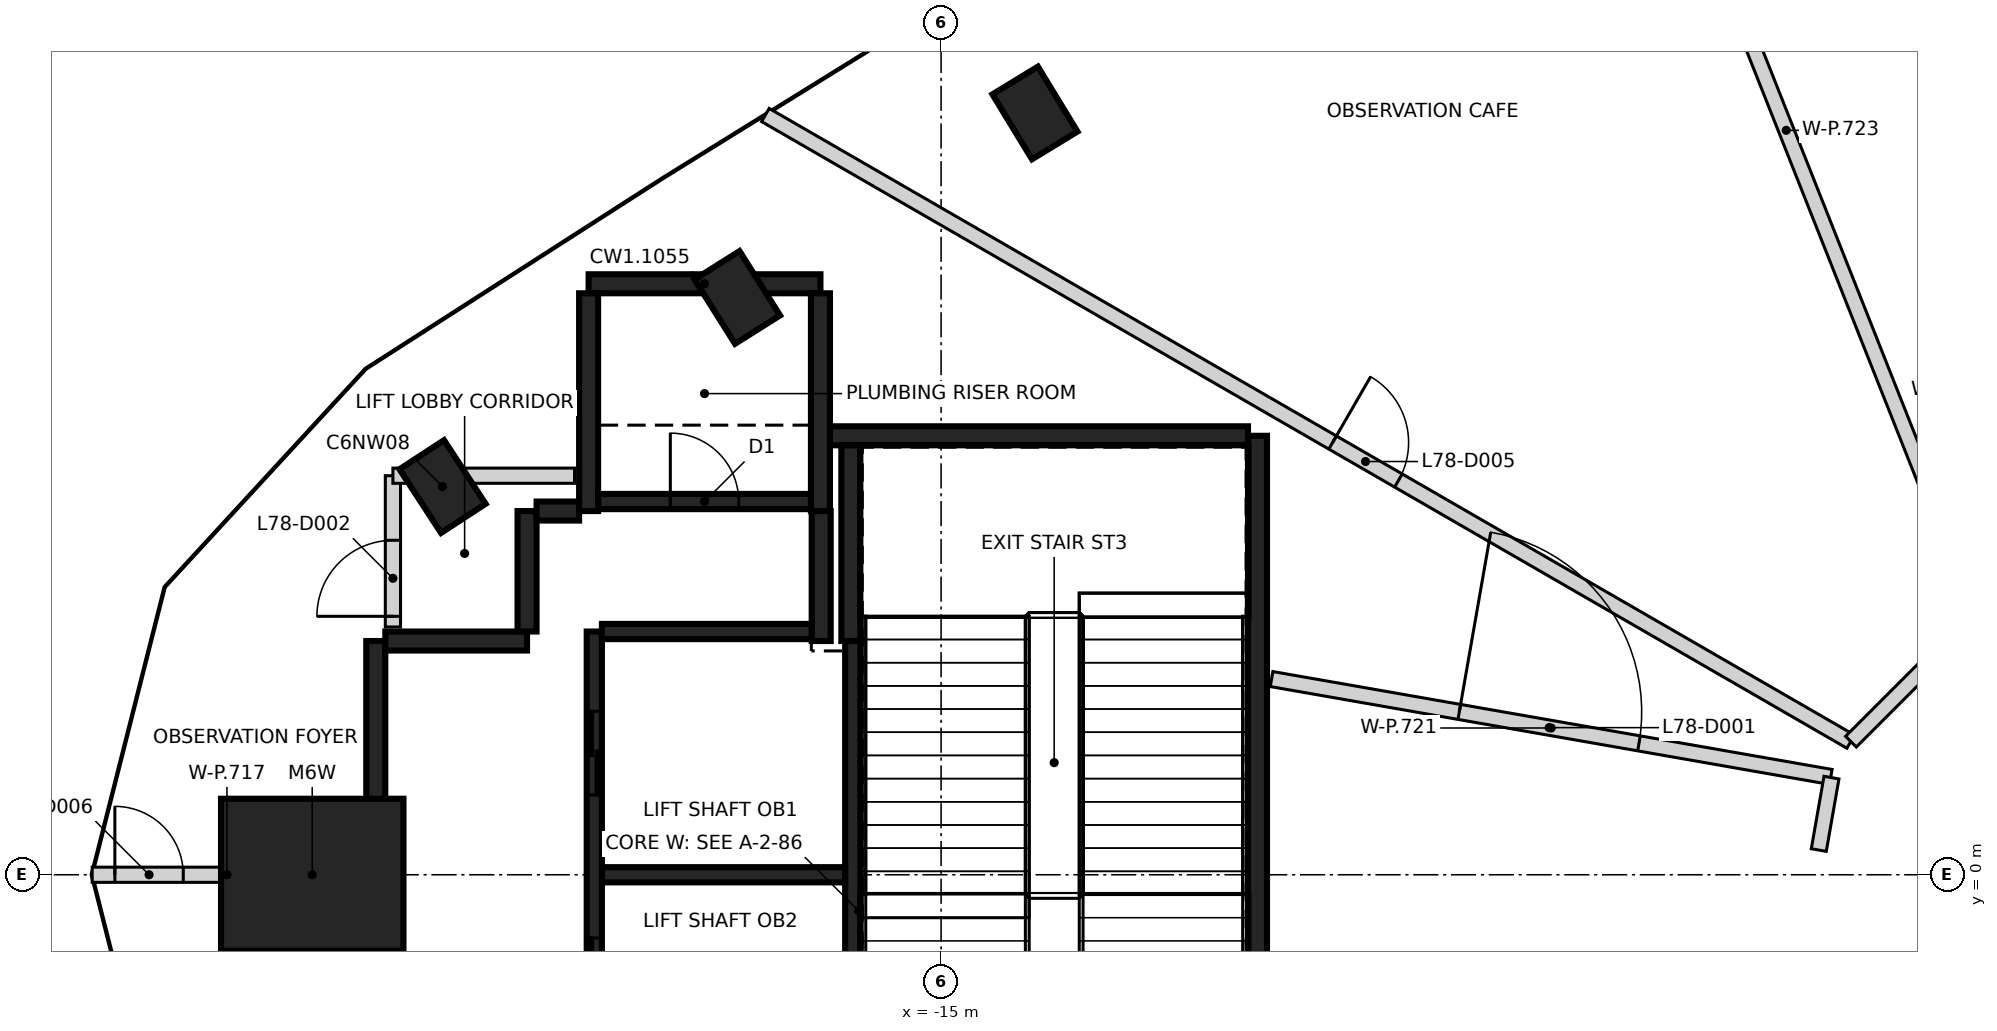
"""IFC4 building model, lengths in metres.
Left out: names, types, materials, properties, quantities, classifications, styles, units other than length and angle.
Written with IfcOpenShell. Run it as: python <this file> out.ifc"""

import sys

from ifc_helpers import new_model, si_unit, direction, frame, frame_2d, origin, origin_2d, place, context, subcontext, project, spatial, rectangle, extrude, element, fill, save


model = new_model("IFC4")
c1 = context("Model", 3, precision=1e-05, world=origin(), true_north=direction((0.0, 1.0)))
c2 = subcontext(c1, "Body", "Model", "MODEL_VIEW")
j1 = project(units=[si_unit("LENGTHUNIT", "METRE"), si_unit("PLANEANGLEUNIT", "RADIAN")], contexts=[c1])
p1 = place(None, origin())
s1 = spatial("IfcSite", under=j1, at=p1, CompositionType="ELEMENT")
p2 = place(p1, origin())
s2 = spatial("IfcBuilding", under=s1, at=p2, CompositionType="ELEMENT")
p3 = place(p2, frame((0.0, 0.0, 312.6)))
s3 = spatial("IfcBuildingStorey", under=s2, at=p3, CompositionType="ELEMENT", Elevation=312.6)
for number, where, z_axis, x_axis in (
    (1, (-13.765, 10.022, -0.35), (0.0, 0.0, 1.0), (-0.52, 0.854, 0.0)),
    (2, (-17.681, 7.595, -0.35), (0.0, 0.0, 1.0), (-0.533, 0.846, 0.0)),
    (3, (-21.559, 5.107, -0.35), (0.0, 0.0, 1.0), (-0.547, 0.837, 0.0)),
):
    element("IfcColumn", number, at=place(p3, frame(where, z_axis=z_axis, x_axis=x_axis)), inside=s3, PredefinedType="COLUMN", context=c2, shape_type="SweptSolid", body=[
        extrude(rectangle(XDim=1.0, YDim=0.7, at=origin_2d()), origin(), (0.0, 0.0, 1.0), 8.1),
    ])
p4 = place(p3, frame((-23.273, 0.0, -0.35), z_axis=(0.0, 0.0, 1.0), x_axis=(1.0, 0.0, 0.0)))
e4 = element("IfcColumn", 4, at=p4, inside=s3, PredefinedType="COLUMN", context=c2, shape_type="SweptSolid", body=[
    extrude(rectangle(XDim=2.4, YDim=2.0, at=origin_2d()), origin(), (0.0, 0.0, 1.0), 8.1),
])
p5 = place(p3, frame((-10.837, 5.775, 0.0), z_axis=(0.0, 0.0, 1.0), x_axis=(0.0, -1.0, 0.0)))
e5 = element("IfcWall", 5, at=p5, inside=s3, PredefinedType="SHEAR", context=c2, shape_type="SweptSolid", body=[
    extrude(rectangle(XDim=11.55, YDim=0.25, at=frame_2d((5.775, 0.0))), origin(), (0.0, 0.0, 1.0), 7.75),
])
p6 = place(p5, frame((10.025, 0.0, 0.0)))
e6 = element("IfcOpeningElement", 6, at=p6, cuts=e5, PredefinedType="OPENING", context=c2, shape_type="SweptSolid", body=[
    extrude(rectangle(XDim=1.2, YDim=2.1, at=frame_2d((0.6, 1.05))), frame((0.0, 0.135, 0.0), z_axis=(0.0, -1.0, 0.0), x_axis=(1.0, 0.0, 0.0)), (0.0, 0.0, 1.0), 0.27),
])
p7 = place(p5, frame((8.725, 0.0, 0.0)))
e7 = element("IfcOpeningElement", 7, at=p7, cuts=e5, PredefinedType="OPENING", context=c2, shape_type="SweptSolid", body=[
    extrude(rectangle(XDim=1.2, YDim=2.1, at=frame_2d((0.6, 1.05))), frame((0.0, 0.135, 0.0), z_axis=(0.0, -1.0, 0.0), x_axis=(1.0, 0.0, 0.0)), (0.0, 0.0, 1.0), 0.27),
])
p8 = place(p3, frame((-22.437, -5.675, 0.0), z_axis=(0.0, 0.0, 1.0), x_axis=(0.0, 1.0, 0.0)))
e8 = element("IfcWall", 8, at=p8, inside=s3, PredefinedType="SHEAR", context=c2, shape_type="SweptSolid", body=[
    extrude(rectangle(XDim=8.75, YDim=0.25, at=frame_2d((4.375, 0.0))), origin(), (0.0, 0.0, 1.0), 7.75),
])
p9 = place(p3, frame((-16.472, 5.775, 0.0), z_axis=(0.0, 0.0, 1.0), x_axis=(1.0, 0.0, 0.0)))
e9 = element("IfcWall", 9, at=p9, inside=s3, PredefinedType="SHEAR", context=c2, shape_type="SweptSolid", body=[
    extrude(rectangle(XDim=5.51, YDim=0.25, at=frame_2d((2.755, 0.0))), origin(), (0.0, 0.0, 1.0), 7.75),
])
p10 = place(p3, frame((-19.637, 7.775, 0.0), z_axis=(0.0, 0.0, 1.0), x_axis=(1.0, 0.0, 0.0)))
e10 = element("IfcWall", 10, at=p10, inside=s3, PredefinedType="SHEAR", context=c2, shape_type="SweptSolid", body=[
    extrude(rectangle(XDim=3.05, YDim=0.25, at=frame_2d((1.525, 0.0))), origin(), (0.0, 0.0, 1.0), 7.75),
])
for number, where, z_axis, x_axis in (
    (11, (-16.587, 7.65, 0.0), (0.0, 0.0, 1.0), (0.0, -1.0, 0.0)),
    (12, (-19.637, 4.785, 0.0), (0.0, 0.0, 1.0), (0.0, 1.0, 0.0)),
):
    element("IfcWall", number, at=place(p3, frame(where, z_axis=z_axis, x_axis=x_axis)), inside=s3, PredefinedType="SHEAR", context=c2, shape_type="SweptSolid", body=[
        extrude(rectangle(XDim=2.865, YDim=0.25, at=frame_2d((1.432, 0.0))), origin(), (0.0, 0.0, 1.0), 7.75),
    ])
p11 = place(p3, frame((-16.187, 3.075, 0.0), z_axis=(0.0, 0.0, 1.0), x_axis=(0.0, 1.0, 0.0)))
e13 = element("IfcWall", 13, at=p11, inside=s3, PredefinedType="SHEAR", context=c2, shape_type="SweptSolid", body=[
    extrude(rectangle(XDim=2.575, YDim=0.25, at=frame_2d((1.287, 0.0))), origin(), (0.0, 0.0, 1.0), 7.75),
])
p12 = place(p3, frame((-22.312, 3.075, 0.0), z_axis=(0.0, 0.0, 1.0), x_axis=(1.0, 0.0, 0.0)))
e14 = element("IfcWall", 14, at=p12, inside=s3, PredefinedType="SHEAR", context=c2, shape_type="SweptSolid", body=[
    extrude(rectangle(XDim=1.865, YDim=0.25, at=frame_2d((0.932, 0.0))), origin(), (0.0, 0.0, 1.0), 7.75),
])
p13 = place(p3, frame((-16.577, 4.785, 0.0), z_axis=(0.0, 0.0, 1.0), x_axis=(0.0, -1.0, 0.0)))
e15 = element("IfcWall", 15, at=p13, inside=s3, PredefinedType="SHEAR", context=c2, shape_type="SweptSolid", body=[
    extrude(rectangle(XDim=1.71, YDim=0.25, at=frame_2d((0.855, 0.0))), origin(), (0.0, 0.0, 1.0), 7.75),
])
p14 = place(p3, frame((-20.447, 3.2, 0.0), z_axis=(0.0, 0.0, 1.0), x_axis=(0.0, 1.0, 0.0)))
e16 = element("IfcWall", 16, at=p14, inside=s3, PredefinedType="SHEAR", context=c2, shape_type="SweptSolid", body=[
    extrude(rectangle(XDim=1.584, YDim=0.25, at=frame_2d((0.792, 0.0))), origin(), (0.0, 0.0, 1.0), 7.75),
])
p15 = place(p3, frame((-20.322, 4.785, 0.0), z_axis=(0.0, 0.0, 1.0), x_axis=(1.0, 0.0, 0.0)))
e17 = element("IfcWall", 17, at=p15, inside=s3, PredefinedType="SHEAR", context=c2, shape_type="SweptSolid", body=[
    extrude(rectangle(XDim=0.559, YDim=0.25, at=frame_2d((0.28, 0.0))), origin(), (0.0, 0.0, 1.0), 7.75),
])
p16 = place(p3, frame((-16.162, 3.074, 0.0), z_axis=(0.0, 0.0, 1.0), x_axis=(0.0, -1.0, 0.0)))
e18 = element("IfcWall", 18, at=p16, inside=s3, PredefinedType="SHEAR", context=c2, shape_type="SweptSolid", body=[
    extrude(rectangle(XDim=5.974, YDim=0.2, at=frame_2d((2.987, 0.0))), origin(), (0.0, 0.0, 1.0), 7.75),
])
p17 = place(p3, frame((-19.562, -2.9, 0.0), z_axis=(0.0, 0.0, 1.0), x_axis=(0.0, 1.0, 0.0)))
e19 = element("IfcWall", 19, at=p17, inside=s3, PredefinedType="SHEAR", context=c2, shape_type="SweptSolid", body=[
    extrude(rectangle(XDim=6.1, YDim=0.2, at=frame_2d((3.05, 0.0))), origin(), (0.0, 0.0, 1.0), 7.75),
])
p18 = place(p17, frame((3.95, 0.0, 0.0)))
e20 = element("IfcOpeningElement", 20, at=p18, cuts=e19, PredefinedType="OPENING", context=c2, shape_type="SweptSolid", body=[
    extrude(rectangle(XDim=1.1, YDim=2.1, at=frame_2d((0.55, 1.05))), frame((0.0, 0.11, 0.0), z_axis=(0.0, -1.0, 0.0), x_axis=(1.0, 0.0, 0.0)), (0.0, 0.0, 1.0), 0.22),
])
p19 = place(p17, frame((0.968, 0.0, 0.0)))
e21 = element("IfcOpeningElement", 21, at=p19, cuts=e19, PredefinedType="OPENING", context=c2, shape_type="SweptSolid", body=[
    extrude(rectangle(XDim=1.1, YDim=2.1, at=frame_2d((0.55, 1.05))), frame((0.0, 0.11, 0.0), z_axis=(0.0, -1.0, 0.0), x_axis=(1.0, 0.0, 0.0)), (0.0, 0.0, 1.0), 0.22),
])
p20 = place(p3, frame((-16.263, 0.0, 0.0), z_axis=(0.0, 0.0, 1.0), x_axis=(-1.0, 0.0, 0.0)))
e22 = element("IfcWall", 22, at=p20, inside=s3, PredefinedType="SHEAR", context=c2, shape_type="SweptSolid", body=[
    extrude(rectangle(XDim=3.198, YDim=0.2, at=frame_2d((1.599, 0.0))), origin(), (0.0, 0.0, 1.0), 7.75),
])
p21 = place(p3, frame((-19.511, 4.91, 0.0), z_axis=(0.0, 0.0, 1.0), x_axis=(1.0, 0.0, 0.0)))
e23 = element("IfcWall", 23, at=p21, inside=s3, PredefinedType="SHEAR", context=c2, shape_type="SweptSolid", body=[
    extrude(rectangle(XDim=2.798, YDim=0.2, at=frame_2d((1.399, 0.0))), origin(), (0.0, 0.0, 1.0), 7.75),
])
p22 = place(p21, frame((0.949, 0.0, 0.0)))
e24 = element("IfcOpeningElement", 24, at=p22, cuts=e23, PredefinedType="OPENING", context=c2, shape_type="SweptSolid", body=[
    extrude(rectangle(XDim=0.9, YDim=2.1, at=frame_2d((0.45, 1.05))), frame((0.0, 0.11, 0.0), z_axis=(0.0, -1.0, 0.0), x_axis=(1.0, 0.0, 0.0)), (0.0, 0.0, 1.0), 0.22),
])
p23 = place(p3, frame((-19.462, 3.2, 0.0), z_axis=(0.0, 0.0, 1.0), x_axis=(1.0, 0.0, 0.0)))
e25 = element("IfcWall", 25, at=p23, inside=s3, PredefinedType="SHEAR", context=c2, shape_type="SweptSolid", body=[
    extrude(rectangle(XDim=2.759, YDim=0.2, at=frame_2d((1.379, 0.0))), origin(), (0.0, 0.0, 1.0), 7.75),
])
p24 = place(p3, frame((-22.212, 3.26, 0.0), z_axis=(0.0, 0.0, 1.0), x_axis=(0.0, 1.0, 0.0)))
e26 = element("IfcWall", 26, at=p24, inside=s3, PredefinedType="PARTITIONING", context=c2, shape_type="SweptSolid", body=[
    extrude(rectangle(XDim=1.99, YDim=0.2, at=frame_2d((0.995, 0.0))), origin(), (0.0, 0.0, 1.0), 7.75),
])
p25 = place(p24, frame((0.14, 0.0, 0.0)))
e27 = element("IfcOpeningElement", 27, at=p25, cuts=e26, PredefinedType="OPENING", context=c2, shape_type="SweptSolid", body=[
    extrude(rectangle(XDim=1.0, YDim=2.1, at=frame_2d((0.5, 1.05))), frame((0.0, 0.11, 0.0), z_axis=(0.0, -1.0, 0.0), x_axis=(1.0, 0.0, 0.0)), (0.0, 0.0, 1.0), 0.22),
])
p26 = place(p3, frame((-22.212, 5.25, 0.0), z_axis=(0.0, 0.0, 1.0), x_axis=(1.0, 0.0, 0.0)))
e28 = element("IfcWall", 28, at=p26, inside=s3, PredefinedType="PARTITIONING", context=c2, shape_type="SweptSolid", body=[
    extrude(rectangle(XDim=2.39, YDim=0.2, at=frame_2d((1.195, 0.0))), origin(), (0.0, 0.0, 1.0), 7.75),
])
p27 = place(p3, frame((-26.168, 0.0, 0.0), z_axis=(0.0, 0.0, 1.0), x_axis=(1.0, 0.0, 0.0)))
e29 = element("IfcWall", 29, at=p27, inside=s3, PredefinedType="PARTITIONING", context=c2, shape_type="SweptSolid", body=[
    extrude(rectangle(XDim=3.546, YDim=0.2, at=frame_2d((1.773, 0.0))), origin(), (0.0, 0.0, 1.0), 7.75),
])
p28 = place(p27, frame((0.298, 0.0, 0.0)))
e30 = element("IfcOpeningElement", 30, at=p28, cuts=e29, PredefinedType="OPENING", context=c2, shape_type="SweptSolid", body=[
    extrude(rectangle(XDim=0.9, YDim=2.1, at=frame_2d((0.45, 1.05))), frame((0.0, 0.11, 0.0), z_axis=(0.0, -1.0, 0.0), x_axis=(1.0, 0.0, 0.0)), (0.0, 0.0, 1.0), 0.22),
])
p29 = place(p3, frame((-17.312, 9.995, 0.0), z_axis=(0.0, 0.0, 1.0), x_axis=(0.866015691277, -0.500016822178, 0.0)))
e31 = element("IfcWall", 31, at=p29, inside=s3, PredefinedType="PARTITIONING", context=c2, shape_type="SweptSolid", body=[
    extrude(rectangle(XDim=16.488, YDim=0.2, at=frame_2d((8.244, 0.0))), origin(), (0.0, 0.0, 1.0), 7.75),
])
p30 = place(p29, frame((8.617, 0.0, 0.0)))
e32 = element("IfcOpeningElement", 32, at=p30, cuts=e31, PredefinedType="OPENING", context=c2, shape_type="SweptSolid", body=[
    extrude(rectangle(XDim=1.0, YDim=2.1, at=frame_2d((0.5, 1.05))), frame((0.0, 0.11, 0.0), z_axis=(0.0, -1.0, 0.0), x_axis=(1.0, 0.0, 0.0)), (0.0, 0.0, 1.0), 0.22),
])
p31 = place(p3, frame((-10.652, 2.575, 0.0), z_axis=(0.0, 0.0, 1.0), x_axis=(0.985029357115, -0.172386674722, 0.0)))
e33 = element("IfcWall", 33, at=p31, inside=s3, PredefinedType="PARTITIONING", context=c2, shape_type="SweptSolid", body=[
    extrude(rectangle(XDim=7.469, YDim=0.2, at=frame_2d((3.735, 0.0))), origin(), (0.0, 0.0, 1.0), 7.75),
])
p32 = place(p31, frame((2.507, 0.0, 0.0)))
e34 = element("IfcOpeningElement", 34, at=p32, cuts=e33, PredefinedType="OPENING", context=c2, shape_type="SweptSolid", body=[
    extrude(rectangle(XDim=2.4, YDim=2.1, at=frame_2d((1.2, 1.05))), frame((0.0, 0.11, 0.0), z_axis=(0.0, -1.0, 0.0), x_axis=(1.0, 0.0, 0.0)), (0.0, 0.0, 1.0), 0.22),
])
p33 = place(p3, frame((-6.507, 16.421, 0.0), z_axis=(0.0, 0.0, 1.0), x_axis=(0.368383356077, -0.929673976706, 0.0)))
e35 = element("IfcWall", 35, at=p33, inside=s3, PredefinedType="PARTITIONING", context=c2, shape_type="SweptSolid", body=[
    extrude(rectangle(XDim=14.258, YDim=0.2, at=frame_2d((7.129, 0.0))), origin(), (0.0, 0.0, 1.0), 7.75),
])
p34 = place(p3, frame((-3.453, 0.325, 0.0), z_axis=(0.0, 0.0, 1.0), x_axis=(0.172576174049, 0.984996174688, 0.0)))
e36 = element("IfcWall", 36, at=p34, inside=s3, PredefinedType="PARTITIONING", context=c2, shape_type="SweptSolid", body=[
    extrude(rectangle(XDim=0.968, YDim=0.2, at=frame_2d((0.484, 0.0))), origin(), (0.0, 0.0, 1.0), 7.75),
])
p35 = place(p3, frame((-3.03, 1.751, 0.0), z_axis=(0.0, 0.0, 1.0), x_axis=(0.707106781187, 0.707106781187, 0.0)))
e37 = element("IfcWall", 37, at=p35, inside=s3, PredefinedType="PARTITIONING", context=c2, shape_type="SweptSolid", body=[
    extrude(rectangle(XDim=1.809, YDim=0.2, at=frame_2d((0.904, 0.0))), origin(), (0.0, 0.0, 1.0), 7.75),
])
p36 = place(p18, origin())
e38 = element("IfcDoor", 38, at=p36, inside=s3, OperationType="DOUBLE_DOOR_SLIDING", PredefinedType="DOOR", context=c2, shape_type="SweptSolid", body=[
    extrude(rectangle(XDim=1.1, YDim=2.1, at=frame_2d((0.55, 1.05))), frame((0.0, 0.025, 0.0), z_axis=(0.0, -1.0, 0.0), x_axis=(1.0, 0.0, 0.0)), (0.0, 0.0, 1.0), 0.05),
])
fill(e20, e38)
p37 = place(p19, origin())
e39 = element("IfcDoor", 39, at=p37, inside=s3, OperationType="DOUBLE_DOOR_SLIDING", PredefinedType="DOOR", context=c2, shape_type="SweptSolid", body=[
    extrude(rectangle(XDim=1.1, YDim=2.1, at=frame_2d((0.55, 1.05))), frame((0.0, 0.025, 0.0), z_axis=(0.0, -1.0, 0.0), x_axis=(1.0, 0.0, 0.0)), (0.0, 0.0, 1.0), 0.05),
])
fill(e21, e39)
p38 = place(p22, origin())
e40 = element("IfcDoor", 40, at=p38, inside=s3, OperationType="SINGLE_SWING_RIGHT", PredefinedType="DOOR", context=c2, shape_type="SweptSolid", body=[
    extrude(rectangle(XDim=0.9, YDim=2.1, at=frame_2d((0.45, 1.05))), frame((0.0, 0.025, 0.0), z_axis=(0.0, -1.0, 0.0), x_axis=(1.0, 0.0, 0.0)), (0.0, 0.0, 1.0), 0.05),
])
fill(e24, e40)
p39 = place(p32, origin())
e41 = element("IfcDoor", 41, at=p39, inside=s3, OperationType="DOUBLE_DOOR_SINGLE_SWING", PredefinedType="DOOR", context=c2, shape_type="SweptSolid", body=[
    extrude(rectangle(XDim=2.4, YDim=2.1, at=frame_2d((1.2, 1.05))), frame((0.0, 0.025, 0.0), z_axis=(0.0, -1.0, 0.0), x_axis=(1.0, 0.0, 0.0)), (0.0, 0.0, 1.0), 0.05),
])
fill(e34, e41)
p40 = place(p25, frame((1.0, 0.0, 0.0), z_axis=(0.0, 0.0, 1.0), x_axis=(-1.0, 0.0, 0.0)))
e42 = element("IfcDoor", 42, at=p40, inside=s3, OperationType="SINGLE_SWING_LEFT", PredefinedType="DOOR", context=c2, shape_type="SweptSolid", body=[
    extrude(rectangle(XDim=1.0, YDim=2.1, at=frame_2d((0.5, 1.05))), frame((0.0, 0.025, 0.0), z_axis=(0.0, -1.0, 0.0), x_axis=(1.0, 0.0, 0.0)), (0.0, 0.0, 1.0), 0.05),
])
fill(e27, e42)
p41 = place(p30, origin())
e43 = element("IfcDoor", 43, at=p41, inside=s3, OperationType="SINGLE_SWING_LEFT", PredefinedType="DOOR", context=c2, shape_type="SweptSolid", body=[
    extrude(rectangle(XDim=1.0, YDim=2.1, at=frame_2d((0.5, 1.05))), frame((0.0, 0.025, 0.0), z_axis=(0.0, -1.0, 0.0), x_axis=(1.0, 0.0, 0.0)), (0.0, 0.0, 1.0), 0.05),
])
fill(e32, e43)
p42 = place(p28, frame((0.9, 0.0, 0.0), z_axis=(0.0, 0.0, 1.0), x_axis=(-1.0, 0.0, 0.0)))
e44 = element("IfcDoor", 44, at=p42, inside=s3, OperationType="SINGLE_SWING_LEFT", PredefinedType="DOOR", context=c2, shape_type="SweptSolid", body=[
    extrude(rectangle(XDim=0.9, YDim=2.1, at=frame_2d((0.45, 1.05))), frame((0.0, 0.025, 0.0), z_axis=(0.0, -1.0, 0.0), x_axis=(1.0, 0.0, 0.0)), (0.0, 0.0, 1.0), 0.05),
])
fill(e30, e44)
save(model, sys.argv[1])
